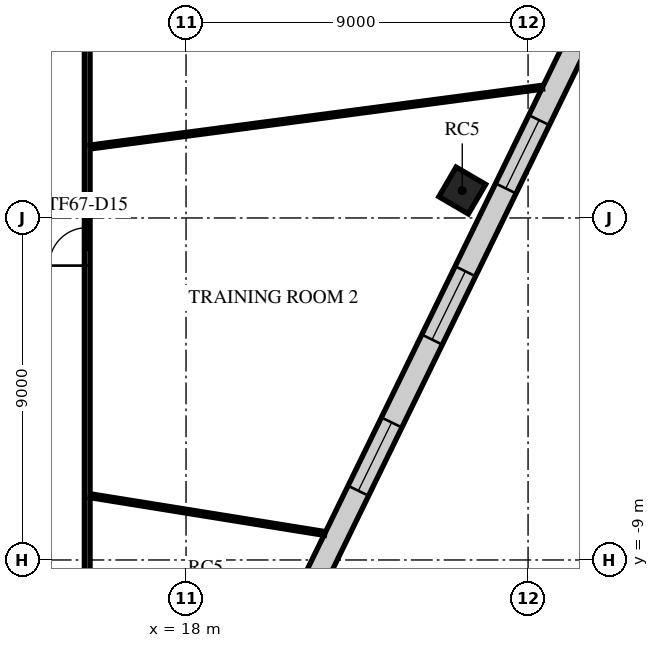
"""IFC4 building model, lengths in metres.
Left out: names, types, materials, properties, quantities, classifications, styles, units other than length and angle.
Written with IfcOpenShell. Run it as: python <this file> out.ifc"""

import sys

from ifc_helpers import new_model, si_unit, direction, frame, frame_2d, origin, origin_2d, place, context, subcontext, project, spatial, rectangle, extrude, element, fill, save


model = new_model("IFC4")
c1 = context("Model", 3, precision=1e-05, world=origin(), true_north=direction((0.0, 1.0)))
c2 = subcontext(c1, "Body", "Model", "MODEL_VIEW")
j1 = project(units=[si_unit("LENGTHUNIT", "METRE"), si_unit("PLANEANGLEUNIT", "RADIAN")], contexts=[c1])
p1 = place(None, origin())
s1 = spatial("IfcSite", under=j1, at=p1, CompositionType="ELEMENT")
p2 = place(p1, origin())
s2 = spatial("IfcBuilding", under=s1, at=p2, CompositionType="ELEMENT")
p3 = place(p2, frame((0.0, 0.0, 282.9)))
s3 = spatial("IfcBuildingStorey", under=s2, at=p3, CompositionType="ELEMENT", Elevation=282.9)
p4 = place(p3, frame((25.268, 0.722, 0.0), z_axis=(0.0, 0.0, 1.0), x_axis=(0.504643651291, 0.863327739165, 0.0)))
e1 = element("IfcColumn", 1, at=p4, inside=s3, PredefinedType="COLUMN", context=c2, shape_type="SweptSolid", body=[
    extrude(rectangle(XDim=0.9, YDim=0.9, at=origin_2d()), origin(), (0.0, 0.0, 1.0), 4.0),
])
p5 = place(p3, frame((10.36, -32.137, 0.0), z_axis=(0.0, 0.0, 1.0), x_axis=(0.438372256832, 0.898793504894, 0.0)))
e2 = element("IfcWall", 2, at=p5, inside=s3, PredefinedType="STANDARD", context=c2, shape_type="SweptSolid", body=[
    extrude(rectangle(XDim=48.687, YDim=0.6, at=frame_2d((24.343, 0.0))), origin(), (0.0, 0.0, 1.0), 3.64),
])
p6 = place(p5, frame((1.213, 0.0, 0.9)))
e3 = element("IfcOpeningElement", 3, at=p6, cuts=e2, PredefinedType="OPENING", context=c2, shape_type="SweptSolid", body=[
    extrude(rectangle(XDim=2.0, YDim=2.1, at=frame_2d((1.0, 1.05))), frame((0.0, 0.31, 0.0), z_axis=(0.0, -1.0, 0.0), x_axis=(1.0, 0.0, 0.0)), (0.0, 0.0, 1.0), 0.62),
])
p7 = place(p5, frame((5.639, 0.0, 0.9)))
e4 = element("IfcOpeningElement", 4, at=p7, cuts=e2, PredefinedType="OPENING", context=c2, shape_type="SweptSolid", body=[
    extrude(rectangle(XDim=2.0, YDim=2.1, at=frame_2d((1.0, 1.05))), frame((0.0, 0.31, 0.0), z_axis=(0.0, -1.0, 0.0), x_axis=(1.0, 0.0, 0.0)), (0.0, 0.0, 1.0), 0.62),
])
p8 = place(p5, frame((10.065, 0.0, 0.9)))
e5 = element("IfcOpeningElement", 5, at=p8, cuts=e2, PredefinedType="OPENING", context=c2, shape_type="SweptSolid", body=[
    extrude(rectangle(XDim=2.0, YDim=2.1, at=frame_2d((1.0, 1.05))), frame((0.0, 0.31, 0.0), z_axis=(0.0, -1.0, 0.0), x_axis=(1.0, 0.0, 0.0)), (0.0, 0.0, 1.0), 0.62),
])
p9 = place(p5, frame((14.491, 0.0, 0.9)))
e6 = element("IfcOpeningElement", 6, at=p9, cuts=e2, PredefinedType="OPENING", context=c2, shape_type="SweptSolid", body=[
    extrude(rectangle(XDim=2.0, YDim=2.1, at=frame_2d((1.0, 1.05))), frame((0.0, 0.31, 0.0), z_axis=(0.0, -1.0, 0.0), x_axis=(1.0, 0.0, 0.0)), (0.0, 0.0, 1.0), 0.62),
])
p10 = place(p5, frame((18.917, 0.0, 0.9)))
e7 = element("IfcOpeningElement", 7, at=p10, cuts=e2, PredefinedType="OPENING", context=c2, shape_type="SweptSolid", body=[
    extrude(rectangle(XDim=2.0, YDim=2.1, at=frame_2d((1.0, 1.05))), frame((0.0, 0.31, 0.0), z_axis=(0.0, -1.0, 0.0), x_axis=(1.0, 0.0, 0.0)), (0.0, 0.0, 1.0), 0.62),
])
p11 = place(p5, frame((23.343, 0.0, 0.9)))
e8 = element("IfcOpeningElement", 8, at=p11, cuts=e2, PredefinedType="OPENING", context=c2, shape_type="SweptSolid", body=[
    extrude(rectangle(XDim=2.0, YDim=2.1, at=frame_2d((1.0, 1.05))), frame((0.0, 0.31, 0.0), z_axis=(0.0, -1.0, 0.0), x_axis=(1.0, 0.0, 0.0)), (0.0, 0.0, 1.0), 0.62),
])
p12 = place(p5, frame((27.769, 0.0, 0.9)))
e9 = element("IfcOpeningElement", 9, at=p12, cuts=e2, PredefinedType="OPENING", context=c2, shape_type="SweptSolid", body=[
    extrude(rectangle(XDim=2.0, YDim=2.1, at=frame_2d((1.0, 1.05))), frame((0.0, 0.31, 0.0), z_axis=(0.0, -1.0, 0.0), x_axis=(1.0, 0.0, 0.0)), (0.0, 0.0, 1.0), 0.62),
])
p13 = place(p5, frame((32.195, 0.0, 0.9)))
e10 = element("IfcOpeningElement", 10, at=p13, cuts=e2, PredefinedType="OPENING", context=c2, shape_type="SweptSolid", body=[
    extrude(rectangle(XDim=2.0, YDim=2.1, at=frame_2d((1.0, 1.05))), frame((0.0, 0.31, 0.0), z_axis=(0.0, -1.0, 0.0), x_axis=(1.0, 0.0, 0.0)), (0.0, 0.0, 1.0), 0.62),
])
p14 = place(p5, frame((36.621, 0.0, 0.9)))
e11 = element("IfcOpeningElement", 11, at=p14, cuts=e2, PredefinedType="OPENING", context=c2, shape_type="SweptSolid", body=[
    extrude(rectangle(XDim=2.0, YDim=2.1, at=frame_2d((1.0, 1.05))), frame((0.0, 0.31, 0.0), z_axis=(0.0, -1.0, 0.0), x_axis=(1.0, 0.0, 0.0)), (0.0, 0.0, 1.0), 0.62),
])
p15 = place(p5, frame((41.047, 0.0, 0.9)))
e12 = element("IfcOpeningElement", 12, at=p15, cuts=e2, PredefinedType="OPENING", context=c2, shape_type="SweptSolid", body=[
    extrude(rectangle(XDim=2.0, YDim=2.1, at=frame_2d((1.0, 1.05))), frame((0.0, 0.31, 0.0), z_axis=(0.0, -1.0, 0.0), x_axis=(1.0, 0.0, 0.0)), (0.0, 0.0, 1.0), 0.62),
])
p16 = place(p5, frame((45.473, 0.0, 0.9)))
e13 = element("IfcOpeningElement", 13, at=p16, cuts=e2, PredefinedType="OPENING", context=c2, shape_type="SweptSolid", body=[
    extrude(rectangle(XDim=2.0, YDim=2.1, at=frame_2d((1.0, 1.05))), frame((0.0, 0.31, 0.0), z_axis=(0.0, -1.0, 0.0), x_axis=(1.0, 0.0, 0.0)), (0.0, 0.0, 1.0), 0.62),
])
p17 = place(p3, frame((15.4, -15.325, 0.0), z_axis=(0.0, 0.0, 1.0), x_axis=(0.0, 1.0, 0.0)))
e14 = element("IfcWall", 14, at=p17, inside=s3, PredefinedType="PARTITIONING", context=c2, shape_type="SweptSolid", body=[
    extrude(rectangle(XDim=26.808, YDim=0.15, at=frame_2d((13.404, 0.0))), origin(), (0.0, 0.0, 1.0), 3.24),
])
p18 = place(p17, frame((0.3, 0.0, 0.0)))
e15 = element("IfcOpeningElement", 15, at=p18, cuts=e14, PredefinedType="OPENING", context=c2, shape_type="SweptSolid", body=[
    extrude(rectangle(XDim=1.0, YDim=2.1, at=frame_2d((0.5, 1.05))), frame((0.0, 0.085, 0.0), z_axis=(0.0, -1.0, 0.0), x_axis=(1.0, 0.0, 0.0)), (0.0, 0.0, 1.0), 0.17),
])
p19 = place(p17, frame((14.072, 0.0, 0.0)))
e16 = element("IfcOpeningElement", 16, at=p19, cuts=e14, PredefinedType="OPENING", context=c2, shape_type="SweptSolid", body=[
    extrude(rectangle(XDim=1.0, YDim=2.1, at=frame_2d((0.5, 1.05))), frame((0.0, 0.085, 0.0), z_axis=(0.0, -1.0, 0.0), x_axis=(1.0, 0.0, 0.0)), (0.0, 0.0, 1.0), 0.17),
])
p20 = place(p3, frame((15.483, -7.31, 0.0), z_axis=(0.0, 0.0, 1.0), x_axis=(0.987314947832, -0.158774033734, 0.0)))
e17 = element("IfcWall", 17, at=p20, inside=s3, PredefinedType="PARTITIONING", context=c2, shape_type="SweptSolid", body=[
    extrude(rectangle(XDim=6.246, YDim=0.1, at=frame_2d((3.123, 0.0))), origin(), (0.0, 0.0, 1.0), 3.04),
])
p21 = place(p3, frame((15.482, 1.868, 0.0), z_axis=(0.0, 0.0, 1.0), x_axis=(0.991377248415, 0.131038739785, 0.0)))
e18 = element("IfcWall", 18, at=p21, inside=s3, PredefinedType="PARTITIONING", context=c2, shape_type="SweptSolid", body=[
    extrude(rectangle(XDim=11.999, YDim=0.1, at=frame_2d((5.999, 0.0))), origin(), (0.0, 0.0, 1.0), 3.04),
])
p22 = place(p12, origin())
e19 = element("IfcWindow", 19, at=p22, inside=s3, PartitioningType="SINGLE_PANEL", PredefinedType="WINDOW", context=c2, shape_type="SweptSolid", body=[
    extrude(rectangle(XDim=2.0, YDim=2.1, at=frame_2d((1.0, 1.05))), frame((0.0, 0.03, 0.0), z_axis=(0.0, -1.0, 0.0), x_axis=(1.0, 0.0, 0.0)), (0.0, 0.0, 1.0), 0.06),
])
fill(e9, e19)
p23 = place(p13, origin())
e20 = element("IfcWindow", 20, at=p23, inside=s3, PartitioningType="SINGLE_PANEL", PredefinedType="WINDOW", context=c2, shape_type="SweptSolid", body=[
    extrude(rectangle(XDim=2.0, YDim=2.1, at=frame_2d((1.0, 1.05))), frame((0.0, 0.03, 0.0), z_axis=(0.0, -1.0, 0.0), x_axis=(1.0, 0.0, 0.0)), (0.0, 0.0, 1.0), 0.06),
])
fill(e10, e20)
p24 = place(p14, origin())
e21 = element("IfcWindow", 21, at=p24, inside=s3, PartitioningType="SINGLE_PANEL", PredefinedType="WINDOW", context=c2, shape_type="SweptSolid", body=[
    extrude(rectangle(XDim=2.0, YDim=2.1, at=frame_2d((1.0, 1.05))), frame((0.0, 0.03, 0.0), z_axis=(0.0, -1.0, 0.0), x_axis=(1.0, 0.0, 0.0)), (0.0, 0.0, 1.0), 0.06),
])
fill(e11, e21)
p25 = place(p19, frame((1.0, 0.0, 0.0), z_axis=(0.0, 0.0, 1.0), x_axis=(-1.0, 0.0, 0.0)))
e22 = element("IfcDoor", 22, at=p25, inside=s3, OperationType="SINGLE_SWING_RIGHT", PredefinedType="DOOR", context=c2, shape_type="SweptSolid", body=[
    extrude(rectangle(XDim=1.0, YDim=2.1, at=frame_2d((0.5, 1.05))), frame((0.0, 0.025, 0.0), z_axis=(0.0, -1.0, 0.0), x_axis=(1.0, 0.0, 0.0)), (0.0, 0.0, 1.0), 0.05),
])
fill(e16, e22)
save(model, sys.argv[1])
